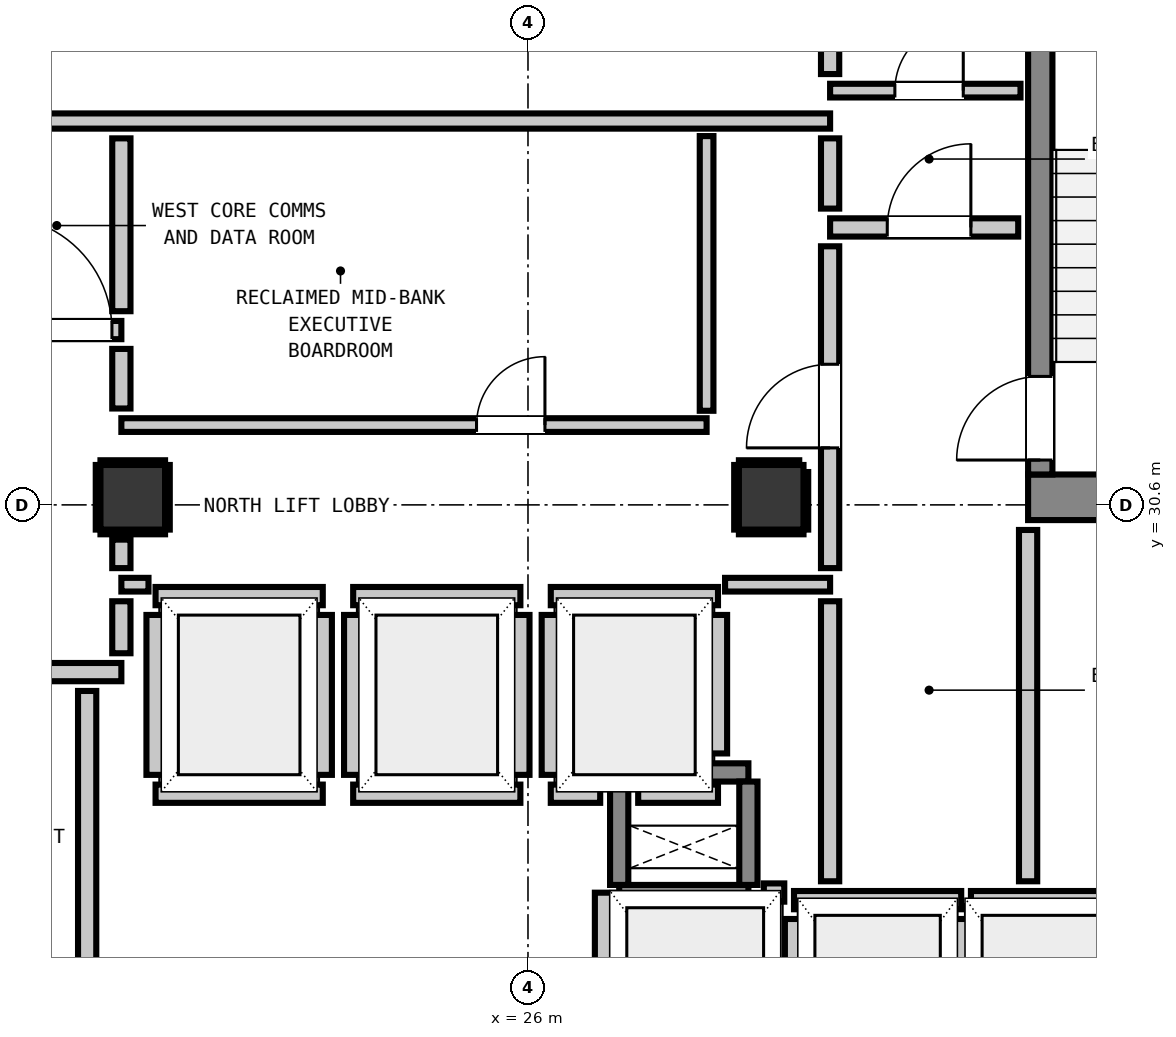
"""IFC4 building model, lengths in metres.
Left out: names, types, materials, properties, quantities, classifications, styles, units other than length and angle.
Written with IfcOpenShell. Run it as: python <this file> out.ifc"""

import sys

from ifc_helpers import new_model, si_unit, direction, frame, frame_2d, origin, origin_2d, place, context, subcontext, project, spatial, rectangle, extrude, element, fill, save


model = new_model("IFC4")
c1 = context("Model", 3, precision=1e-05, world=origin(), true_north=direction((0.0, 1.0)))
c2 = subcontext(c1, "Body", "Model", "MODEL_VIEW")
j1 = project(units=[si_unit("LENGTHUNIT", "METRE"), si_unit("PLANEANGLEUNIT", "RADIAN")], contexts=[c1])
p1 = place(None, origin())
s1 = spatial("IfcSite", under=j1, at=p1, CompositionType="ELEMENT")
p2 = place(p1, origin())
s2 = spatial("IfcBuilding", under=s1, at=p2, CompositionType="ELEMENT")
p3 = place(p2, frame((0.0, 0.0, 223.36)))
s3 = spatial("IfcBuildingStorey", under=s2, at=p3, CompositionType="ELEMENT", Elevation=223.36)
p4 = place(p3, frame((32.58, 30.7, 0.0), z_axis=(0.0, 0.0, 1.0), x_axis=(1.0, 0.0, 0.0)))
e1 = element("IfcWall", 1, at=p4, inside=s3, PredefinedType="SHEAR", context=c2, shape_type="SweptSolid", body=[
    extrude(rectangle(XDim=3.54, YDim=0.6, at=frame_2d((1.77, 0.0))), origin(), (0.0, 0.0, 1.0), 3.32),
])
p5 = place(p3, frame((32.74, 31.0, 0.0), z_axis=(0.0, 0.0, 1.0), x_axis=(0.0, 1.0, 0.0)))
e2 = element("IfcWall", 2, at=p5, inside=s3, PredefinedType="SHEAR", context=c2, shape_type="SweptSolid", body=[
    extrude(rectangle(XDim=7.8, YDim=0.32, at=frame_2d((3.9, 0.0))), origin(), (0.0, 0.0, 1.0), 3.32),
])
p6 = place(p5, frame((0.19, 0.0, 0.0)))
e3 = element("IfcOpeningElement", 3, at=p6, cuts=e2, PredefinedType="OPENING", context=c2, shape_type="SweptSolid", body=[
    extrude(rectangle(XDim=1.1, YDim=2.15, at=frame_2d((0.55, 1.075))), frame((0.0, 0.17, 0.0), z_axis=(0.0, -1.0, 0.0), x_axis=(1.0, 0.0, 0.0)), (0.0, 0.0, 1.0), 0.34),
])
for number, where, z_axis, x_axis in (
    (4, (27.2, 25.48, 0.0), (0.0, 0.0, 1.0), (1.0, 0.0, 0.0)),
    (5, (27.2, 27.08, 0.0), (0.0, 0.0, 1.0), (1.0, 0.0, 0.0)),
):
    element("IfcWall", number, at=place(p3, frame(where, z_axis=z_axis, x_axis=x_axis)), inside=s3, PredefinedType="SHEAR", context=c2, shape_type="SweptSolid", body=[
        extrude(rectangle(XDim=1.7, YDim=0.24, at=frame_2d((0.85, 0.0))), origin(), (0.0, 0.0, 1.0), 3.32),
    ])
for number, where, z_axis, x_axis in (
    (6, (27.2, 25.6, 0.0), (0.0, 0.0, 1.0), (0.0, 1.0, 0.0)),
    (7, (28.9, 25.6, 0.0), (0.0, 0.0, 1.0), (0.0, 1.0, 0.0)),
):
    element("IfcWall", number, at=place(p3, frame(where, z_axis=z_axis, x_axis=x_axis)), inside=s3, PredefinedType="SHEAR", context=c2, shape_type="SweptSolid", body=[
        extrude(rectangle(XDim=1.36, YDim=0.24, at=frame_2d((0.68, 0.0))), origin(), (0.0, 0.0, 1.0), 3.32),
    ])
for number, where, z_axis, x_axis in (
    (8, (20.8, 30.7, 0.0), (0.0, 0.0, 1.0), (1.0, 0.0, 0.0)),
    (9, (29.2, 30.7, 0.0), (0.0, 0.0, 1.0), (1.0, 0.0, 0.0)),
):
    element("IfcColumn", number, at=place(p3, frame(where, z_axis=z_axis, x_axis=x_axis)), inside=s3, PredefinedType="COLUMN", context=c2, shape_type="SweptSolid", body=[
        extrude(rectangle(XDim=0.85, YDim=0.85, at=origin_2d()), origin(), (0.0, 0.0, 1.0), 3.32),
    ])
for number, where, z_axis, x_axis in (
    (10, (21.1, 26.8, 0.0), (0.0, 0.0, 1.0), (1.0, 0.0, 0.0)),
    (11, (21.1, 29.4, 0.0), (0.0, 0.0, 1.0), (1.0, 0.0, 0.0)),
):
    element("IfcWall", number, at=place(p3, frame(where, z_axis=z_axis, x_axis=x_axis)), inside=s3, PredefinedType="PARTITIONING", context=c2, shape_type="SweptSolid", body=[
        extrude(rectangle(XDim=2.2, YDim=0.24, at=frame_2d((1.1, 0.0))), origin(), (0.0, 0.0, 1.0), 2.92),
    ])
p7 = place(p3, frame((21.1, 27.048, 0.0), z_axis=(0.0, 0.0, 1.0), x_axis=(0.0, 1.0, 0.0)))
e12 = element("IfcWall", 12, at=p7, inside=s3, PredefinedType="PARTITIONING", context=c2, shape_type="SweptSolid", body=[
    extrude(rectangle(XDim=2.104, YDim=0.24, at=frame_2d((1.052, 0.0))), origin(), (0.0, 0.0, 1.0), 1.849),
])
p8 = place(p3, frame((23.3, 27.048, 0.0), z_axis=(0.0, 0.0, 1.0), x_axis=(0.0, 1.0, 0.0)))
e13 = element("IfcWall", 13, at=p8, inside=s3, PredefinedType="PARTITIONING", context=c2, shape_type="SweptSolid", body=[
    extrude(rectangle(XDim=2.104, YDim=0.24, at=frame_2d((1.052, 0.0))), origin(), (0.0, 0.0, 1.0), 2.92),
])
for number, where, z_axis, x_axis in (
    (14, (23.7, 26.8, 0.0), (0.0, 0.0, 1.0), (1.0, 0.0, 0.0)),
    (15, (23.7, 29.4, 0.0), (0.0, 0.0, 1.0), (1.0, 0.0, 0.0)),
):
    element("IfcWall", number, at=place(p3, frame(where, z_axis=z_axis, x_axis=x_axis)), inside=s3, PredefinedType="PARTITIONING", context=c2, shape_type="SweptSolid", body=[
        extrude(rectangle(XDim=2.2, YDim=0.24, at=frame_2d((1.1, 0.0))), origin(), (0.0, 0.0, 1.0), 2.92),
    ])
for number, where, z_axis, x_axis in (
    (16, (23.7, 27.048, 0.0), (0.0, 0.0, 1.0), (0.0, 1.0, 0.0)),
    (17, (25.9, 27.048, 0.0), (0.0, 0.0, 1.0), (0.0, 1.0, 0.0)),
):
    element("IfcWall", number, at=place(p3, frame(where, z_axis=z_axis, x_axis=x_axis)), inside=s3, PredefinedType="PARTITIONING", context=c2, shape_type="SweptSolid", body=[
        extrude(rectangle(XDim=2.104, YDim=0.24, at=frame_2d((1.052, 0.0))), origin(), (0.0, 0.0, 1.0), 2.92),
    ])
p9 = place(p3, frame((26.3, 26.8, 0.0), z_axis=(0.0, 0.0, 1.0), x_axis=(1.0, 0.0, 0.0)))
e18 = element("IfcWall", 18, at=p9, inside=s3, PredefinedType="PARTITIONING", context=c2, shape_type="SweptSolid", body=[
    extrude(rectangle(XDim=0.65, YDim=0.24, at=frame_2d((0.325, 0.0))), origin(), (0.0, 0.0, 1.0), 2.92),
])
p10 = place(p3, frame((27.45, 26.8, 0.0), z_axis=(0.0, 0.0, 1.0), x_axis=(1.0, 0.0, 0.0)))
e19 = element("IfcWall", 19, at=p10, inside=s3, PredefinedType="PARTITIONING", context=c2, shape_type="SweptSolid", body=[
    extrude(rectangle(XDim=1.05, YDim=0.24, at=frame_2d((0.525, 0.0))), origin(), (0.0, 0.0, 1.0), 2.92),
])
p11 = place(p3, frame((26.3, 29.4, 0.0), z_axis=(0.0, 0.0, 1.0), x_axis=(1.0, 0.0, 0.0)))
e20 = element("IfcWall", 20, at=p11, inside=s3, PredefinedType="PARTITIONING", context=c2, shape_type="SweptSolid", body=[
    extrude(rectangle(XDim=2.2, YDim=0.24, at=frame_2d((1.1, 0.0))), origin(), (0.0, 0.0, 1.0), 2.92),
])
p12 = place(p3, frame((26.3, 27.048, 0.0), z_axis=(0.0, 0.0, 1.0), x_axis=(0.0, 1.0, 0.0)))
e21 = element("IfcWall", 21, at=p12, inside=s3, PredefinedType="PARTITIONING", context=c2, shape_type="SweptSolid", body=[
    extrude(rectangle(XDim=2.104, YDim=0.24, at=frame_2d((1.052, 0.0))), origin(), (0.0, 0.0, 1.0), 2.92),
])
p13 = place(p3, frame((28.5, 27.33, 0.0), z_axis=(0.0, 0.0, 1.0), x_axis=(0.0, 1.0, 0.0)))
e22 = element("IfcWall", 22, at=p13, inside=s3, PredefinedType="PARTITIONING", context=c2, shape_type="SweptSolid", body=[
    extrude(rectangle(XDim=1.822, YDim=0.24, at=frame_2d((0.911, 0.0))), origin(), (0.0, 0.0, 1.0), 2.92),
])
p14 = place(p3, frame((29.5, 25.4, 0.0), z_axis=(0.0, 0.0, 1.0), x_axis=(1.0, 0.0, 0.0)))
e23 = element("IfcWall", 23, at=p14, inside=s3, PredefinedType="PARTITIONING", context=c2, shape_type="SweptSolid", body=[
    extrude(rectangle(XDim=2.2, YDim=0.24, at=frame_2d((1.1, 0.0))), origin(), (0.0, 0.0, 1.0), 2.92),
])
p15 = place(p3, frame((29.5, 22.848, 0.0), z_axis=(0.0, 0.0, 1.0), x_axis=(0.0, 1.0, 0.0)))
e24 = element("IfcWall", 24, at=p15, inside=s3, PredefinedType="PARTITIONING", context=c2, shape_type="SweptSolid", body=[
    extrude(rectangle(XDim=2.304, YDim=0.24, at=frame_2d((1.152, 0.0))), origin(), (0.0, 0.0, 1.0), 1.849),
])
p16 = place(p3, frame((31.7, 22.848, 0.0), z_axis=(0.0, 0.0, 1.0), x_axis=(0.0, 1.0, 0.0)))
e25 = element("IfcWall", 25, at=p16, inside=s3, PredefinedType="PARTITIONING", context=c2, shape_type="SweptSolid", body=[
    extrude(rectangle(XDim=2.304, YDim=0.24, at=frame_2d((1.152, 0.0))), origin(), (0.0, 0.0, 1.0), 2.92),
])
p17 = place(p3, frame((31.828, 25.4, 0.0), z_axis=(0.0, 0.0, 1.0), x_axis=(1.0, 0.0, 0.0)))
e26 = element("IfcWall", 26, at=p17, inside=s3, PredefinedType="PARTITIONING", context=c2, shape_type="SweptSolid", body=[
    extrude(rectangle(XDim=2.072, YDim=0.24, at=frame_2d((1.036, 0.0))), origin(), (0.0, 0.0, 1.0), 2.92),
])
p18 = place(p3, frame((29.103, 25.5, 0.0), z_axis=(0.0, 0.0, 1.0), x_axis=(1.0, 0.0, 0.0)))
e27 = element("IfcWall", 27, at=p18, inside=s3, PredefinedType="PARTITIONING", context=c2, shape_type="SweptSolid", body=[
    extrude(rectangle(XDim=0.269, YDim=0.24, at=frame_2d((0.135, 0.0))), origin(), (0.0, 0.0, 1.0), 2.92),
])
p19 = place(p3, frame((27.0, 22.848, 0.0), z_axis=(0.0, 0.0, 1.0), x_axis=(0.0, 1.0, 0.0)))
e28 = element("IfcWall", 28, at=p19, inside=s3, PredefinedType="PARTITIONING", context=c2, shape_type="SweptSolid", body=[
    extrude(rectangle(XDim=2.65, YDim=0.24, at=frame_2d((1.325, 0.0))), origin(), (0.0, 0.0, 1.0), 2.92),
])
p20 = place(p3, frame((17.45, 28.4, 0.0), z_axis=(0.0, 0.0, 1.0), x_axis=(1.0, 0.0, 0.0)))
e29 = element("IfcWall", 29, at=p20, inside=s3, PredefinedType="PARTITIONING", context=c2, shape_type="SweptSolid", body=[
    extrude(rectangle(XDim=3.2, YDim=0.24, at=frame_2d((1.6, 0.0))), origin(), (0.0, 0.0, 1.0), 2.92),
])
p21 = place(p20, frame((0.784, 0.0, 0.0)))
e30 = element("IfcOpeningElement", 30, at=p21, cuts=e29, PredefinedType="OPENING", context=c2, shape_type="SweptSolid", body=[
    extrude(rectangle(XDim=1.1, YDim=2.15, at=frame_2d((0.55, 1.075))), frame((0.0, 0.13, 0.0), z_axis=(0.0, -1.0, 0.0), x_axis=(1.0, 0.0, 0.0)), (0.0, 0.0, 1.0), 0.26),
])
p22 = place(p3, frame((17.45, 32.9, 0.0), z_axis=(0.0, 0.0, 1.0), x_axis=(1.0, 0.0, 0.0)))
e31 = element("IfcWall", 31, at=p22, inside=s3, PredefinedType="PARTITIONING", context=c2, shape_type="SweptSolid", body=[
    extrude(rectangle(XDim=3.2, YDim=0.24, at=frame_2d((1.6, 0.0))), origin(), (0.0, 0.0, 1.0), 2.92),
])
p23 = place(p22, frame((0.159, 0.0, 0.0)))
e32 = element("IfcOpeningElement", 32, at=p23, cuts=e31, PredefinedType="OPENING", context=c2, shape_type="SweptSolid", body=[
    extrude(rectangle(XDim=1.1, YDim=2.15, at=frame_2d((0.55, 1.075))), frame((0.0, 0.13, 0.0), z_axis=(0.0, -1.0, 0.0), x_axis=(1.0, 0.0, 0.0)), (0.0, 0.0, 1.0), 0.26),
])
p24 = place(p22, frame((1.576, 0.0, 0.0)))
e33 = element("IfcOpeningElement", 33, at=p24, cuts=e31, PredefinedType="OPENING", context=c2, shape_type="SweptSolid", body=[
    extrude(rectangle(XDim=1.5, YDim=2.15, at=frame_2d((0.75, 1.075))), frame((0.0, 0.13, 0.0), z_axis=(0.0, -1.0, 0.0), x_axis=(1.0, 0.0, 0.0)), (0.0, 0.0, 1.0), 0.26),
])
p25 = place(p3, frame((29.975, 34.25, 0.0), z_axis=(0.0, 0.0, 1.0), x_axis=(1.0, 0.0, 0.0)))
e34 = element("IfcWall", 34, at=p25, inside=s3, PredefinedType="PARTITIONING", context=c2, shape_type="SweptSolid", body=[
    extrude(rectangle(XDim=2.475, YDim=0.24, at=frame_2d((1.237, 0.0))), origin(), (0.0, 0.0, 1.0), 2.92),
])
p26 = place(p25, frame((0.752, 0.0, 0.0)))
e35 = element("IfcOpeningElement", 35, at=p26, cuts=e34, PredefinedType="OPENING", context=c2, shape_type="SweptSolid", body=[
    extrude(rectangle(XDim=1.1, YDim=2.15, at=frame_2d((0.55, 1.075))), frame((0.0, 0.13, 0.0), z_axis=(0.0, -1.0, 0.0), x_axis=(1.0, 0.0, 0.0)), (0.0, 0.0, 1.0), 0.26),
])
p27 = place(p3, frame((18.95, 35.65, 0.0), z_axis=(0.0, 0.0, 1.0), x_axis=(1.0, 0.0, 0.0)))
e36 = element("IfcWall", 36, at=p27, inside=s3, PredefinedType="PARTITIONING", context=c2, shape_type="SweptSolid", body=[
    extrude(rectangle(XDim=11.025, YDim=0.2, at=frame_2d((5.513, 0.0))), origin(), (0.0, 0.0, 1.0), 2.92),
])
p28 = place(p3, frame((20.65, 29.55, 0.0), z_axis=(0.0, 0.0, 1.0), x_axis=(1.0, 0.0, 0.0)))
e37 = element("IfcWall", 37, at=p28, inside=s3, PredefinedType="PARTITIONING", context=c2, shape_type="SweptSolid", body=[
    extrude(rectangle(XDim=0.357, YDim=0.18, at=frame_2d((0.179, 0.0))), origin(), (0.0, 0.0, 1.0), 2.92),
])
p29 = place(p3, frame((28.593, 29.55, 0.0), z_axis=(0.0, 0.0, 1.0), x_axis=(1.0, 0.0, 0.0)))
e38 = element("IfcWall", 38, at=p29, inside=s3, PredefinedType="PARTITIONING", context=c2, shape_type="SweptSolid", body=[
    extrude(rectangle(XDim=1.382, YDim=0.18, at=frame_2d((0.691, 0.0))), origin(), (0.0, 0.0, 1.0), 2.92),
])
p30 = place(p3, frame((20.65, 31.65, 0.0), z_axis=(0.0, 0.0, 1.0), x_axis=(1.0, 0.0, 0.0)))
e39 = element("IfcWall", 39, at=p30, inside=s3, PredefinedType="PARTITIONING", context=c2, shape_type="SweptSolid", body=[
    extrude(rectangle(XDim=7.7, YDim=0.18, at=frame_2d((3.85, 0.0))), origin(), (0.0, 0.0, 1.0), 2.92),
])
p31 = place(p30, frame((4.673, 0.0, 0.0)))
e40 = element("IfcOpeningElement", 40, at=p31, cuts=e39, PredefinedType="OPENING", context=c2, shape_type="SweptSolid", body=[
    extrude(rectangle(XDim=0.9, YDim=2.1, at=frame_2d((0.45, 1.05))), frame((0.0, 0.1, 0.0), z_axis=(0.0, -1.0, 0.0), x_axis=(1.0, 0.0, 0.0)), (0.0, 0.0, 1.0), 0.2),
])
p32 = place(p3, frame((29.975, 36.05, 0.0), z_axis=(0.0, 0.0, 1.0), x_axis=(1.0, 0.0, 0.0)))
e41 = element("IfcWall", 41, at=p32, inside=s3, PredefinedType="PARTITIONING", context=c2, shape_type="SweptSolid", body=[
    extrude(rectangle(XDim=2.505, YDim=0.18, at=frame_2d((1.252, 0.0))), origin(), (0.0, 0.0, 1.0), 2.92),
])
p33 = place(p32, frame((0.852, 0.0, 0.0)))
e42 = element("IfcOpeningElement", 42, at=p33, cuts=e41, PredefinedType="OPENING", context=c2, shape_type="SweptSolid", body=[
    extrude(rectangle(XDim=0.9, YDim=2.1, at=frame_2d((0.45, 1.05))), frame((0.0, 0.1, 0.0), z_axis=(0.0, -1.0, 0.0), x_axis=(1.0, 0.0, 0.0)), (0.0, 0.0, 1.0), 0.2),
])
p34 = place(p3, frame((20.2, 21.398, 0.0), z_axis=(0.0, 0.0, 1.0), x_axis=(0.0, 1.0, 0.0)))
e43 = element("IfcWall", 43, at=p34, inside=s3, PredefinedType="PARTITIONING", context=c2, shape_type="SweptSolid", body=[
    extrude(rectangle(XDim=6.754, YDim=0.24, at=frame_2d((3.377, 0.0))), origin(), (0.0, 0.0, 1.0), 2.92),
])
p35 = place(p3, frame((20.65, 28.648, 0.0), z_axis=(0.0, 0.0, 1.0), x_axis=(0.0, 1.0, 0.0)))
e44 = element("IfcWall", 44, at=p35, inside=s3, PredefinedType="PARTITIONING", context=c2, shape_type="SweptSolid", body=[
    extrude(rectangle(XDim=0.684, YDim=0.24, at=frame_2d((0.342, 0.0))), origin(), (0.0, 0.0, 1.0), 1.849),
])
p36 = place(p3, frame((20.65, 29.768, 0.0), z_axis=(0.0, 0.0, 1.0), x_axis=(0.0, 1.0, 0.0)))
e45 = element("IfcWall", 45, at=p36, inside=s3, PredefinedType="PARTITIONING", context=c2, shape_type="SweptSolid", body=[
    extrude(rectangle(XDim=0.375, YDim=0.24, at=frame_2d((0.188, 0.0))), origin(), (0.0, 0.0, 1.0), 1.849),
])
p37 = place(p3, frame((20.65, 31.868, 0.0), z_axis=(0.0, 0.0, 1.0), x_axis=(0.0, 1.0, 0.0)))
e46 = element("IfcWall", 46, at=p37, inside=s3, PredefinedType="PARTITIONING", context=c2, shape_type="SweptSolid", body=[
    extrude(rectangle(XDim=0.784, YDim=0.24, at=frame_2d((0.392, 0.0))), origin(), (0.0, 0.0, 1.0), 1.849),
])
p38 = place(p3, frame((20.65, 33.148, 0.0), z_axis=(0.0, 0.0, 1.0), x_axis=(0.0, 1.0, 0.0)))
e47 = element("IfcWall", 47, at=p38, inside=s3, PredefinedType="PARTITIONING", context=c2, shape_type="SweptSolid", body=[
    extrude(rectangle(XDim=2.274, YDim=0.24, at=frame_2d((1.137, 0.0))), origin(), (0.0, 0.0, 1.0), 1.849),
])
p39 = place(p3, frame((29.975, 25.648, 0.0), z_axis=(0.0, 0.0, 1.0), x_axis=(0.0, 1.0, 0.0)))
e48 = element("IfcWall", 48, at=p39, inside=s3, PredefinedType="PARTITIONING", context=c2, shape_type="SweptSolid", body=[
    extrude(rectangle(XDim=3.684, YDim=0.24, at=frame_2d((1.842, 0.0))), origin(), (0.0, 0.0, 1.0), 2.92),
])
p40 = place(p3, frame((29.975, 29.768, 0.0), z_axis=(0.0, 0.0, 1.0), x_axis=(0.0, 1.0, 0.0)))
e49 = element("IfcWall", 49, at=p40, inside=s3, PredefinedType="PARTITIONING", context=c2, shape_type="SweptSolid", body=[
    extrude(rectangle(XDim=4.234, YDim=0.24, at=frame_2d((2.117, 0.0))), origin(), (0.0, 0.0, 1.0), 2.92),
])
p41 = place(p40, frame((1.582, 0.0, 0.0)))
e50 = element("IfcOpeningElement", 50, at=p41, cuts=e49, PredefinedType="OPENING", context=c2, shape_type="SweptSolid", body=[
    extrude(rectangle(XDim=1.1, YDim=2.15, at=frame_2d((0.55, 1.075))), frame((0.0, 0.13, 0.0), z_axis=(0.0, -1.0, 0.0), x_axis=(1.0, 0.0, 0.0)), (0.0, 0.0, 1.0), 0.26),
])
p42 = place(p3, frame((29.975, 34.498, 0.0), z_axis=(0.0, 0.0, 1.0), x_axis=(0.0, 1.0, 0.0)))
e51 = element("IfcWall", 51, at=p42, inside=s3, PredefinedType="PARTITIONING", context=c2, shape_type="SweptSolid", body=[
    extrude(rectangle(XDim=0.924, YDim=0.24, at=frame_2d((0.462, 0.0))), origin(), (0.0, 0.0, 1.0), 2.92),
])
p43 = place(p3, frame((29.975, 36.268, 0.0), z_axis=(0.0, 0.0, 1.0), x_axis=(0.0, 1.0, 0.0)))
e52 = element("IfcWall", 52, at=p43, inside=s3, PredefinedType="PARTITIONING", context=c2, shape_type="SweptSolid", body=[
    extrude(rectangle(XDim=2.294, YDim=0.24, at=frame_2d((1.147, 0.0))), origin(), (0.0, 0.0, 1.0), 2.92),
])
p44 = place(p3, frame((32.58, 25.648, 0.0), z_axis=(0.0, 0.0, 1.0), x_axis=(0.0, 1.0, 0.0)))
e53 = element("IfcWall", 53, at=p44, inside=s3, PredefinedType="PARTITIONING", context=c2, shape_type="SweptSolid", body=[
    extrude(rectangle(XDim=4.622, YDim=0.24, at=frame_2d((2.311, 0.0))), origin(), (0.0, 0.0, 1.0), 2.92),
])
p45 = place(p3, frame((28.35, 31.838, 0.0), z_axis=(0.0, 0.0, 1.0), x_axis=(0.0, 1.0, 0.0)))
e54 = element("IfcWall", 54, at=p45, inside=s3, PredefinedType="PARTITIONING", context=c2, shape_type="SweptSolid", body=[
    extrude(rectangle(XDim=3.614, YDim=0.18, at=frame_2d((1.807, 0.0))), origin(), (0.0, 0.0, 1.0), 2.92),
])
for number, where, z_axis, x_axis in (
    (55, (20.375, 30.243, 0.0), (0.0, 0.0, 1.0), (1.0, 0.0, 0.0)),
    (56, (20.375, 31.157, 0.0), (0.0, 0.0, 1.0), (1.0, 0.0, 0.0)),
    (57, (20.343, 30.275, 0.0), (0.0, 0.0, 1.0), (0.0, 1.0, 0.0)),
    (58, (21.257, 30.275, 0.0), (0.0, 0.0, 1.0), (0.0, 1.0, 0.0)),
    (59, (28.775, 30.243, 0.0), (0.0, 0.0, 1.0), (1.0, 0.0, 0.0)),
):
    element("IfcWall", number, at=place(p3, frame(where, z_axis=z_axis, x_axis=x_axis)), inside=s3, PredefinedType="PARTITIONING", context=c2, shape_type="SweptSolid", body=[
        extrude(rectangle(XDim=0.85, YDim=0.06, at=frame_2d((0.425, 0.0))), origin(), (0.0, 0.0, 1.0), 1.45),
    ])
p46 = place(p3, frame((28.775, 31.157, 0.0), z_axis=(0.0, 0.0, 1.0), x_axis=(1.0, 0.0, 0.0)))
e60 = element("IfcWall", 60, at=p46, inside=s3, PredefinedType="PARTITIONING", context=c2, shape_type="SweptSolid", body=[
    extrude(rectangle(XDim=0.794, YDim=0.06, at=frame_2d((0.397, 0.0))), origin(), (0.0, 0.0, 1.0), 1.45),
])
p47 = place(p3, frame((28.743, 30.275, 0.0), z_axis=(0.0, 0.0, 1.0), x_axis=(0.0, 1.0, 0.0)))
e61 = element("IfcWall", 61, at=p47, inside=s3, PredefinedType="PARTITIONING", context=c2, shape_type="SweptSolid", body=[
    extrude(rectangle(XDim=0.85, YDim=0.06, at=frame_2d((0.425, 0.0))), origin(), (0.0, 0.0, 1.0), 1.45),
])
p48 = place(p3, frame((29.657, 30.275, 0.0), z_axis=(0.0, 0.0, 1.0), x_axis=(0.0, 1.0, 0.0)))
e62 = element("IfcWall", 62, at=p48, inside=s3, PredefinedType="PARTITIONING", context=c2, shape_type="SweptSolid", body=[
    extrude(rectangle(XDim=0.757, YDim=0.06, at=frame_2d((0.378, 0.0))), origin(), (0.0, 0.0, 1.0), 1.45),
])
p49 = place(p6, origin())
e63 = element("IfcDoor", 63, at=p49, inside=s3, OperationType="SINGLE_SWING_LEFT", PredefinedType="DOOR", context=c2, shape_type="SweptSolid", body=[
    extrude(rectangle(XDim=1.1, YDim=2.15, at=frame_2d((0.55, 1.075))), frame((0.0, 0.025, 0.0), z_axis=(0.0, -1.0, 0.0), x_axis=(1.0, 0.0, 0.0)), (0.0, 0.0, 1.0), 0.05),
])
fill(e3, e63)
p50 = place(p41, origin())
e64 = element("IfcDoor", 64, at=p50, inside=s3, OperationType="SINGLE_SWING_LEFT", PredefinedType="DOOR", context=c2, shape_type="SweptSolid", body=[
    extrude(rectangle(XDim=1.1, YDim=2.15, at=frame_2d((0.55, 1.075))), frame((0.0, 0.025, 0.0), z_axis=(0.0, -1.0, 0.0), x_axis=(1.0, 0.0, 0.0)), (0.0, 0.0, 1.0), 0.05),
])
fill(e50, e64)
p51 = place(p26, origin())
e65 = element("IfcDoor", 65, at=p51, inside=s3, OperationType="SINGLE_SWING_RIGHT", PredefinedType="DOOR", context=c2, shape_type="SweptSolid", body=[
    extrude(rectangle(XDim=1.1, YDim=2.15, at=frame_2d((0.55, 1.075))), frame((0.0, 0.025, 0.0), z_axis=(0.0, -1.0, 0.0), x_axis=(1.0, 0.0, 0.0)), (0.0, 0.0, 1.0), 0.05),
])
fill(e35, e65)
p52 = place(p24, origin())
e66 = element("IfcDoor", 66, at=p52, inside=s3, OperationType="SINGLE_SWING_LEFT", PredefinedType="DOOR", context=c2, shape_type="SweptSolid", body=[
    extrude(rectangle(XDim=1.5, YDim=2.15, at=frame_2d((0.75, 1.075))), frame((0.0, 0.025, 0.0), z_axis=(0.0, -1.0, 0.0), x_axis=(1.0, 0.0, 0.0)), (0.0, 0.0, 1.0), 0.05),
])
fill(e33, e66)
p53 = place(p33, origin())
e67 = element("IfcDoor", 67, at=p53, inside=s3, OperationType="SINGLE_SWING_RIGHT", PredefinedType="DOOR", context=c2, shape_type="SweptSolid", body=[
    extrude(rectangle(XDim=0.9, YDim=2.1, at=frame_2d((0.45, 1.05))), frame((0.0, 0.025, 0.0), z_axis=(0.0, -1.0, 0.0), x_axis=(1.0, 0.0, 0.0)), (0.0, 0.0, 1.0), 0.05),
])
fill(e42, e67)
p54 = place(p31, origin())
e68 = element("IfcDoor", 68, at=p54, inside=s3, OperationType="SINGLE_SWING_RIGHT", PredefinedType="DOOR", context=c2, shape_type="SweptSolid", body=[
    extrude(rectangle(XDim=0.9, YDim=2.1, at=frame_2d((0.45, 1.05))), frame((0.0, 0.025, 0.0), z_axis=(0.0, -1.0, 0.0), x_axis=(1.0, 0.0, 0.0)), (0.0, 0.0, 1.0), 0.05),
])
fill(e40, e68)
save(model, sys.argv[1])
